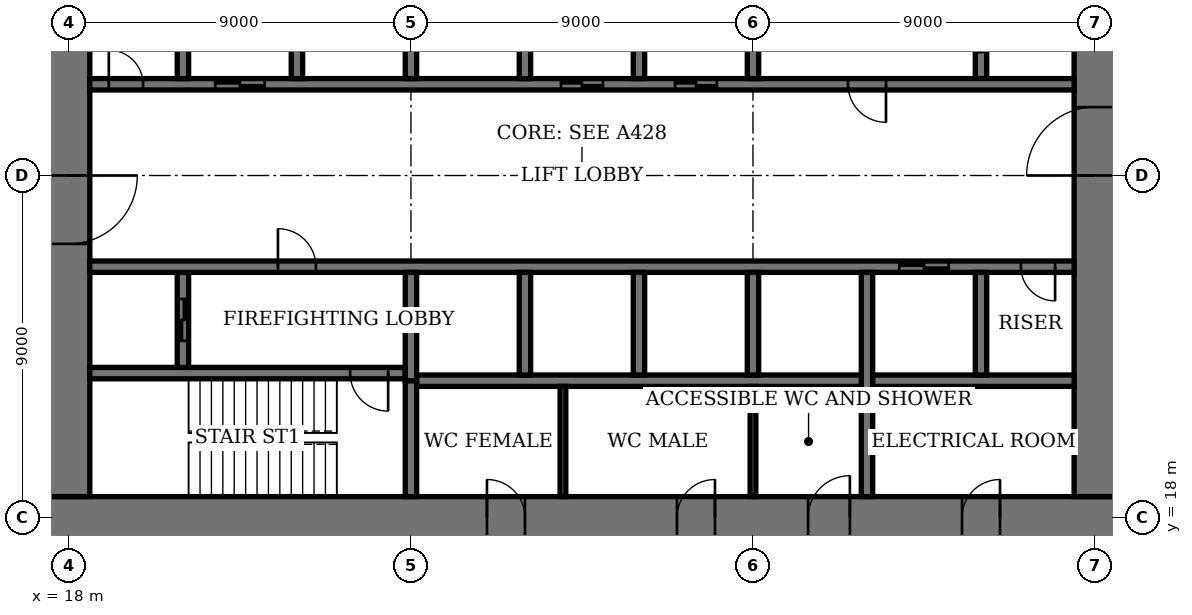
"""IFC4 building model, lengths in metres.
Left out: names, types, materials, properties, quantities, classifications, styles, units other than length and angle.
Written with IfcOpenShell. Run it as: python <this file> out.ifc"""

import sys

from ifc_helpers import new_model, si_unit, direction, frame, frame_2d, origin, place, context, subcontext, project, spatial, rectangle, extrude, element, fill, save


model = new_model("IFC4")
c1 = context("Model", 3, precision=1e-05, world=origin(), true_north=direction((0.0, 1.0)))
c2 = subcontext(c1, "Body", "Model", "MODEL_VIEW")
j1 = project(units=[si_unit("LENGTHUNIT", "METRE"), si_unit("PLANEANGLEUNIT", "RADIAN")], contexts=[c1])
p1 = place(None, origin())
s1 = spatial("IfcSite", under=j1, at=p1, CompositionType="ELEMENT")
p2 = place(p1, origin())
s2 = spatial("IfcBuilding", under=s1, at=p2, CompositionType="ELEMENT")
p3 = place(p2, frame((0.0, 0.0, 117.0)))
s3 = spatial("IfcBuildingStorey", under=s2, at=p3, CompositionType="ELEMENT", Elevation=117.0)
p4 = place(p3, frame((17.45, 18.0, 0.0), z_axis=(0.0, 0.0, 1.0), x_axis=(1.0, 0.0, 0.0)))
e1 = element("IfcWall", 1, at=p4, inside=s3, PredefinedType="SHEAR", context=c2, shape_type="SweptSolid", body=[
    extrude(rectangle(XDim=28.1, YDim=1.1, at=frame_2d((14.05, 0.0))), origin(), (0.0, 0.0, 1.0), 4.0),
])
p5 = place(p4, frame((11.55, 0.0, 0.0)))
e2 = element("IfcOpeningElement", 2, at=p5, cuts=e1, PredefinedType="OPENING", context=c2, shape_type="SweptSolid", body=[
    extrude(rectangle(XDim=1.0, YDim=2.4, at=frame_2d((0.5, 1.2))), frame((0.0, 0.56, 0.0), z_axis=(0.0, -1.0, 0.0), x_axis=(1.0, 0.0, 0.0)), (0.0, 0.0, 1.0), 1.12),
])
p6 = place(p4, frame((16.55, 0.0, 0.0)))
e3 = element("IfcOpeningElement", 3, at=p6, cuts=e1, PredefinedType="OPENING", context=c2, shape_type="SweptSolid", body=[
    extrude(rectangle(XDim=1.0, YDim=2.4, at=frame_2d((0.5, 1.2))), frame((0.0, 0.56, 0.0), z_axis=(0.0, -1.0, 0.0), x_axis=(1.0, 0.0, 0.0)), (0.0, 0.0, 1.0), 1.12),
])
p7 = place(p4, frame((20.0, 0.0, 0.0)))
e4 = element("IfcOpeningElement", 4, at=p7, cuts=e1, PredefinedType="OPENING", context=c2, shape_type="SweptSolid", body=[
    extrude(rectangle(XDim=1.1, YDim=2.4, at=frame_2d((0.55, 1.2))), frame((0.0, 0.56, 0.0), z_axis=(0.0, -1.0, 0.0), x_axis=(1.0, 0.0, 0.0)), (0.0, 0.0, 1.0), 1.12),
])
p8 = place(p4, frame((24.05, 0.0, 0.0)))
e5 = element("IfcOpeningElement", 5, at=p8, cuts=e1, PredefinedType="OPENING", context=c2, shape_type="SweptSolid", body=[
    extrude(rectangle(XDim=1.0, YDim=2.4, at=frame_2d((0.5, 1.2))), frame((0.0, 0.56, 0.0), z_axis=(0.0, -1.0, 0.0), x_axis=(1.0, 0.0, 0.0)), (0.0, 0.0, 1.0), 1.12),
])
p9 = place(p3, frame((18.0, 35.45, 0.0), z_axis=(0.0, 0.0, 1.0), x_axis=(0.0, -1.0, 0.0)))
e6 = element("IfcWall", 6, at=p9, inside=s3, PredefinedType="SHEAR", context=c2, shape_type="SweptSolid", body=[
    extrude(rectangle(XDim=16.9, YDim=1.1, at=frame_2d((8.45, 0.0))), origin(), (0.0, 0.0, 1.0), 4.0),
])
p10 = place(p9, frame((8.45, 0.0, 0.0)))
e7 = element("IfcOpeningElement", 7, at=p10, cuts=e6, PredefinedType="OPENING", context=c2, shape_type="SweptSolid", body=[
    extrude(rectangle(XDim=1.8, YDim=2.4, at=frame_2d((0.9, 1.2))), frame((0.0, 0.56, 0.0), z_axis=(0.0, -1.0, 0.0), x_axis=(1.0, 0.0, 0.0)), (0.0, 0.0, 1.0), 1.12),
])
p11 = place(p3, frame((45.0, 18.55, 0.0), z_axis=(0.0, 0.0, 1.0), x_axis=(0.0, 1.0, 0.0)))
e8 = element("IfcWall", 8, at=p11, inside=s3, PredefinedType="SHEAR", context=c2, shape_type="SweptSolid", body=[
    extrude(rectangle(XDim=16.9, YDim=1.1, at=frame_2d((8.45, 0.0))), origin(), (0.0, 0.0, 1.0), 4.0),
])
p12 = place(p11, frame((8.45, 0.0, 0.0)))
e9 = element("IfcOpeningElement", 9, at=p12, cuts=e8, PredefinedType="OPENING", context=c2, shape_type="SweptSolid", body=[
    extrude(rectangle(XDim=1.8, YDim=2.4, at=frame_2d((0.9, 1.2))), frame((0.0, 0.56, 0.0), z_axis=(0.0, -1.0, 0.0), x_axis=(1.0, 0.0, 0.0)), (0.0, 0.0, 1.0), 1.12),
])
p13 = place(p3, frame((18.55, 21.8, 0.0), z_axis=(0.0, 0.0, 1.0), x_axis=(1.0, 0.0, 0.0)))
e10 = element("IfcWall", 10, at=p13, inside=s3, PredefinedType="SHEAR", context=c2, shape_type="SweptSolid", body=[
    extrude(rectangle(XDim=8.3, YDim=0.3, at=frame_2d((4.15, 0.0))), origin(), (0.0, 0.0, 1.0), 4.0),
])
p14 = place(p13, frame((6.85, 0.0, 0.0)))
e11 = element("IfcOpeningElement", 11, at=p14, cuts=e10, PredefinedType="OPENING", context=c2, shape_type="SweptSolid", body=[
    extrude(rectangle(XDim=1.0, YDim=2.4, at=frame_2d((0.5, 1.2))), frame((0.0, 0.16, 0.0), z_axis=(0.0, -1.0, 0.0), x_axis=(1.0, 0.0, 0.0)), (0.0, 0.0, 1.0), 0.32),
])
p15 = place(p3, frame((27.0, 18.55, 0.0), z_axis=(0.0, 0.0, 1.0), x_axis=(0.0, 1.0, 0.0)))
e12 = element("IfcWall", 12, at=p15, inside=s3, PredefinedType="SHEAR", context=c2, shape_type="SweptSolid", body=[
    extrude(rectangle(XDim=3.05, YDim=0.3, at=frame_2d((1.525, 0.0))), origin(), (0.0, 0.0, 1.0), 4.0),
])
p16 = place(p3, frame((21.0, 21.95, 0.0), z_axis=(0.0, 0.0, 1.0), x_axis=(0.0, 1.0, 0.0)))
e13 = element("IfcWall", 13, at=p16, inside=s3, PredefinedType="SHEAR", context=c2, shape_type="SweptSolid", body=[
    extrude(rectangle(XDim=2.5, YDim=0.3, at=frame_2d((1.25, 0.0))), origin(), (0.0, 0.0, 1.0), 4.0),
])
p17 = place(p16, frame((0.7, 0.0, 0.0)))
e14 = element("IfcOpeningElement", 14, at=p17, cuts=e13, PredefinedType="OPENING", context=c2, shape_type="SweptSolid", body=[
    extrude(rectangle(XDim=1.1, YDim=2.4, at=frame_2d((0.55, 1.2))), frame((0.0, 0.16, 0.0), z_axis=(0.0, -1.0, 0.0), x_axis=(1.0, 0.0, 0.0)), (0.0, 0.0, 1.0), 0.32),
])
p18 = place(p3, frame((42.0, 29.55, 0.0), z_axis=(0.0, 0.0, 1.0), x_axis=(0.0, 1.0, 0.0)))
e15 = element("IfcWall", 15, at=p18, inside=s3, PredefinedType="SHEAR", context=c2, shape_type="SweptSolid", body=[
    extrude(rectangle(XDim=2.5, YDim=0.3, at=frame_2d((1.25, 0.0))), origin(), (0.0, 0.0, 1.0), 4.0),
])
p19 = place(p18, frame((0.7, 0.0, 0.0)))
e16 = element("IfcOpeningElement", 16, at=p19, cuts=e15, PredefinedType="OPENING", context=c2, shape_type="SweptSolid", body=[
    extrude(rectangle(XDim=1.1, YDim=2.4, at=frame_2d((0.55, 1.2))), frame((0.0, 0.16, 0.0), z_axis=(0.0, -1.0, 0.0), x_axis=(1.0, 0.0, 0.0)), (0.0, 0.0, 1.0), 0.32),
])
p20 = place(p3, frame((18.55, 24.6, 0.0), z_axis=(0.0, 0.0, 1.0), x_axis=(1.0, 0.0, 0.0)))
e17 = element("IfcWall", 17, at=p20, inside=s3, PredefinedType="SHEAR", context=c2, shape_type="SweptSolid", body=[
    extrude(rectangle(XDim=25.9, YDim=0.3, at=frame_2d((12.95, 0.0))), origin(), (0.0, 0.0, 1.0), 4.0),
])
p21 = place(p20, frame((4.95, 0.0, 0.0)))
e18 = element("IfcOpeningElement", 18, at=p21, cuts=e17, PredefinedType="OPENING", context=c2, shape_type="SweptSolid", body=[
    extrude(rectangle(XDim=1.0, YDim=2.4, at=frame_2d((0.5, 1.2))), frame((0.0, 0.16, 0.0), z_axis=(0.0, -1.0, 0.0), x_axis=(1.0, 0.0, 0.0)), (0.0, 0.0, 1.0), 0.32),
])
p22 = place(p20, frame((24.5, 0.0, 0.0)))
e19 = element("IfcOpeningElement", 19, at=p22, cuts=e17, PredefinedType="OPENING", context=c2, shape_type="SweptSolid", body=[
    extrude(rectangle(XDim=0.9, YDim=2.1, at=frame_2d((0.45, 1.05))), frame((0.0, 0.16, 0.0), z_axis=(0.0, -1.0, 0.0), x_axis=(1.0, 0.0, 0.0)), (0.0, 0.0, 1.0), 0.32),
])
p23 = place(p20, frame((21.3, 0.0, 0.0)))
e20 = element("IfcOpeningElement", 20, at=p23, cuts=e17, PredefinedType="OPENING", context=c2, shape_type="SweptSolid", body=[
    extrude(rectangle(XDim=1.3, YDim=2.4, at=frame_2d((0.65, 1.2))), frame((0.0, 0.16, 0.0), z_axis=(0.0, -1.0, 0.0), x_axis=(1.0, 0.0, 0.0)), (0.0, 0.0, 1.0), 0.32),
])
p24 = place(p3, frame((18.55, 29.4, 0.0), z_axis=(0.0, 0.0, 1.0), x_axis=(1.0, 0.0, 0.0)))
e21 = element("IfcWall", 21, at=p24, inside=s3, PredefinedType="SHEAR", context=c2, shape_type="SweptSolid", body=[
    extrude(rectangle(XDim=25.9, YDim=0.3, at=frame_2d((12.95, 0.0))), origin(), (0.0, 0.0, 1.0), 4.0),
])
p25 = place(p24, frame((19.95, 0.0, 0.0)))
e22 = element("IfcOpeningElement", 22, at=p25, cuts=e21, PredefinedType="OPENING", context=c2, shape_type="SweptSolid", body=[
    extrude(rectangle(XDim=1.0, YDim=2.4, at=frame_2d((0.5, 1.2))), frame((0.0, 0.16, 0.0), z_axis=(0.0, -1.0, 0.0), x_axis=(1.0, 0.0, 0.0)), (0.0, 0.0, 1.0), 0.32),
])
p26 = place(p24, frame((0.5, 0.0, 0.0)))
e23 = element("IfcOpeningElement", 23, at=p26, cuts=e21, PredefinedType="OPENING", context=c2, shape_type="SweptSolid", body=[
    extrude(rectangle(XDim=0.9, YDim=2.1, at=frame_2d((0.45, 1.05))), frame((0.0, 0.16, 0.0), z_axis=(0.0, -1.0, 0.0), x_axis=(1.0, 0.0, 0.0)), (0.0, 0.0, 1.0), 0.32),
])
p27 = place(p24, frame((15.4, 0.0, 0.0)))
e24 = element("IfcOpeningElement", 24, at=p27, cuts=e21, PredefinedType="OPENING", context=c2, shape_type="SweptSolid", body=[
    extrude(rectangle(XDim=1.1, YDim=2.4, at=frame_2d((0.55, 1.2))), frame((0.0, 0.16, 0.0), z_axis=(0.0, -1.0, 0.0), x_axis=(1.0, 0.0, 0.0)), (0.0, 0.0, 1.0), 0.32),
])
p28 = place(p24, frame((12.4, 0.0, 0.0)))
e25 = element("IfcOpeningElement", 25, at=p28, cuts=e21, PredefinedType="OPENING", context=c2, shape_type="SweptSolid", body=[
    extrude(rectangle(XDim=1.1, YDim=2.4, at=frame_2d((0.55, 1.2))), frame((0.0, 0.16, 0.0), z_axis=(0.0, -1.0, 0.0), x_axis=(1.0, 0.0, 0.0)), (0.0, 0.0, 1.0), 0.32),
])
p29 = place(p24, frame((3.3, 0.0, 0.0)))
e26 = element("IfcOpeningElement", 26, at=p29, cuts=e21, PredefinedType="OPENING", context=c2, shape_type="SweptSolid", body=[
    extrude(rectangle(XDim=1.3, YDim=2.4, at=frame_2d((0.65, 1.2))), frame((0.0, 0.16, 0.0), z_axis=(0.0, -1.0, 0.0), x_axis=(1.0, 0.0, 0.0)), (0.0, 0.0, 1.0), 0.32),
])
p30 = place(p3, frame((27.15, 21.6, 0.0), z_axis=(0.0, 0.0, 1.0), x_axis=(1.0, 0.0, 0.0)))
e27 = element("IfcWall", 27, at=p30, inside=s3, PredefinedType="SHEAR", context=c2, shape_type="SweptSolid", body=[
    extrude(rectangle(XDim=17.3, YDim=0.3, at=frame_2d((8.65, 0.0))), origin(), (0.0, 0.0, 1.0), 4.0),
])
for number, where, z_axis, x_axis in (
    (28, (30.0, 21.75, 0.0), (0.0, 0.0, 1.0), (0.0, 1.0, 0.0)),
    (29, (33.0, 29.55, 0.0), (0.0, 0.0, 1.0), (0.0, 1.0, 0.0)),
    (30, (33.0, 21.75, 0.0), (0.0, 0.0, 1.0), (0.0, 1.0, 0.0)),
    (31, (30.0, 29.55, 0.0), (0.0, 0.0, 1.0), (0.0, 1.0, 0.0)),
    (32, (36.0, 21.75, 0.0), (0.0, 0.0, 1.0), (0.0, 1.0, 0.0)),
    (33, (27.0, 29.55, 0.0), (0.0, 0.0, 1.0), (0.0, 1.0, 0.0)),
):
    element("IfcWall", number, at=place(p3, frame(where, z_axis=z_axis, x_axis=x_axis)), inside=s3, PredefinedType="SHEAR", context=c2, shape_type="SweptSolid", body=[
        extrude(rectangle(XDim=2.7, YDim=0.3, at=frame_2d((1.35, 0.0))), origin(), (0.0, 0.0, 1.0), 4.0),
    ])
for number, where, z_axis, x_axis in (
    (34, (39.0, 18.55, 0.0), (0.0, 0.0, 1.0), (0.0, 1.0, 0.0)),
    (35, (24.0, 29.55, 0.0), (0.0, 0.0, 1.0), (0.0, 1.0, 0.0)),
):
    element("IfcWall", number, at=place(p3, frame(where, z_axis=z_axis, x_axis=x_axis)), inside=s3, PredefinedType="SHEAR", context=c2, shape_type="SweptSolid", body=[
        extrude(rectangle(XDim=5.9, YDim=0.3, at=frame_2d((2.95, 0.0))), origin(), (0.0, 0.0, 1.0), 4.0),
    ])
for number, where, z_axis, x_axis in (
    (36, (42.0, 21.75, 0.0), (0.0, 0.0, 1.0), (0.0, 1.0, 0.0)),
    (37, (21.0, 29.55, 0.0), (0.0, 0.0, 1.0), (0.0, 1.0, 0.0)),
):
    element("IfcWall", number, at=place(p3, frame(where, z_axis=z_axis, x_axis=x_axis)), inside=s3, PredefinedType="SHEAR", context=c2, shape_type="SweptSolid", body=[
        extrude(rectangle(XDim=2.7, YDim=0.3, at=frame_2d((1.35, 0.0))), origin(), (0.0, 0.0, 1.0), 4.0),
    ])
for number, where, z_axis, x_axis in (
    (38, (27.0, 21.6, 0.0), (0.0, 0.0, 1.0), (0.0, 1.0, 0.0)),
    (39, (36.0, 29.55, 0.0), (0.0, 0.0, 1.0), (0.0, 1.0, 0.0)),
):
    element("IfcWall", number, at=place(p3, frame(where, z_axis=z_axis, x_axis=x_axis)), inside=s3, PredefinedType="SHEAR", context=c2, shape_type="SweptSolid", body=[
        extrude(rectangle(XDim=2.85, YDim=0.3, at=frame_2d((1.425, 0.0))), origin(), (0.0, 0.0, 1.0), 4.0),
    ])
for number, where, z_axis, x_axis in (
    (40, (31.0, 18.55, 0.0), (0.0, 0.0, 1.0), (0.0, 1.0, 0.0)),
    (41, (36.0, 18.55, 0.0), (0.0, 0.0, 1.0), (0.0, 1.0, 0.0)),
):
    element("IfcWall", number, at=place(p3, frame(where, z_axis=z_axis, x_axis=x_axis)), inside=s3, PredefinedType="PARTITIONING", context=c2, shape_type="SweptSolid", body=[
        extrude(rectangle(XDim=2.9, YDim=0.15, at=frame_2d((1.45, 0.0))), origin(), (0.0, 0.0, 1.0), 3.75),
    ])
p31 = place(p10, origin())
e42 = element("IfcDoor", 42, at=p31, inside=s3, OperationType="DOUBLE_DOOR_DOUBLE_SWING", PredefinedType="DOOR", context=c2, shape_type="SweptSolid", body=[
    extrude(rectangle(XDim=1.8, YDim=2.4, at=frame_2d((0.9, 1.2))), frame((0.0, 0.03, 0.0), z_axis=(0.0, -1.0, 0.0), x_axis=(1.0, 0.0, 0.0)), (0.0, 0.0, 1.0), 0.06),
    extrude(rectangle(XDim=0.04, YDim=2.4, at=frame_2d((0.02, 1.2))), frame((0.0, 0.55, 0.0), z_axis=(0.0, -1.0, 0.0), x_axis=(1.0, 0.0, 0.0)), (0.0, 0.0, 1.0), 1.1),
    extrude(rectangle(XDim=0.04, YDim=2.4, at=frame_2d((1.78, 1.2))), frame((0.0, 0.55, 0.0), z_axis=(0.0, -1.0, 0.0), x_axis=(1.0, 0.0, 0.0)), (0.0, 0.0, 1.0), 1.1),
    extrude(rectangle(XDim=1.8, YDim=0.04, at=frame_2d((0.9, 2.38))), frame((0.0, 0.55, 0.0), z_axis=(0.0, -1.0, 0.0), x_axis=(1.0, 0.0, 0.0)), (0.0, 0.0, 1.0), 1.1),
])
fill(e7, e42)
p32 = place(p12, origin())
e43 = element("IfcDoor", 43, at=p32, inside=s3, OperationType="DOUBLE_DOOR_DOUBLE_SWING", PredefinedType="DOOR", context=c2, shape_type="SweptSolid", body=[
    extrude(rectangle(XDim=1.8, YDim=2.4, at=frame_2d((0.9, 1.2))), frame((0.0, 0.03, 0.0), z_axis=(0.0, -1.0, 0.0), x_axis=(1.0, 0.0, 0.0)), (0.0, 0.0, 1.0), 0.06),
    extrude(rectangle(XDim=0.04, YDim=2.4, at=frame_2d((0.02, 1.2))), frame((0.0, 0.55, 0.0), z_axis=(0.0, -1.0, 0.0), x_axis=(1.0, 0.0, 0.0)), (0.0, 0.0, 1.0), 1.1),
    extrude(rectangle(XDim=0.04, YDim=2.4, at=frame_2d((1.78, 1.2))), frame((0.0, 0.55, 0.0), z_axis=(0.0, -1.0, 0.0), x_axis=(1.0, 0.0, 0.0)), (0.0, 0.0, 1.0), 1.1),
    extrude(rectangle(XDim=1.8, YDim=0.04, at=frame_2d((0.9, 2.38))), frame((0.0, 0.55, 0.0), z_axis=(0.0, -1.0, 0.0), x_axis=(1.0, 0.0, 0.0)), (0.0, 0.0, 1.0), 1.1),
])
fill(e9, e43)
p33 = place(p5, origin())
e44 = element("IfcDoor", 44, at=p33, inside=s3, OperationType="SINGLE_SWING_RIGHT", PredefinedType="DOOR", context=c2, shape_type="SweptSolid", body=[
    extrude(rectangle(XDim=1.0, YDim=2.4, at=frame_2d((0.5, 1.2))), frame((0.0, 0.025, 0.0), z_axis=(0.0, -1.0, 0.0), x_axis=(1.0, 0.0, 0.0)), (0.0, 0.0, 1.0), 0.05),
    extrude(rectangle(XDim=0.04, YDim=2.4, at=frame_2d((0.02, 1.2))), frame((0.0, 0.4, 0.0), z_axis=(0.0, -1.0, 0.0), x_axis=(1.0, 0.0, 0.0)), (0.0, 0.0, 1.0), 0.8),
    extrude(rectangle(XDim=0.04, YDim=2.4, at=frame_2d((0.98, 1.2))), frame((0.0, 0.4, 0.0), z_axis=(0.0, -1.0, 0.0), x_axis=(1.0, 0.0, 0.0)), (0.0, 0.0, 1.0), 0.8),
    extrude(rectangle(XDim=1.0, YDim=0.04, at=frame_2d((0.5, 2.38))), frame((0.0, 0.4, 0.0), z_axis=(0.0, -1.0, 0.0), x_axis=(1.0, 0.0, 0.0)), (0.0, 0.0, 1.0), 0.8),
])
fill(e2, e44)
p34 = place(p6, origin())
e45 = element("IfcDoor", 45, at=p34, inside=s3, OperationType="SINGLE_SWING_LEFT", PredefinedType="DOOR", context=c2, shape_type="SweptSolid", body=[
    extrude(rectangle(XDim=1.0, YDim=2.4, at=frame_2d((0.5, 1.2))), frame((0.0, 0.025, 0.0), z_axis=(0.0, -1.0, 0.0), x_axis=(1.0, 0.0, 0.0)), (0.0, 0.0, 1.0), 0.05),
    extrude(rectangle(XDim=0.04, YDim=2.4, at=frame_2d((0.02, 1.2))), frame((0.0, 0.4, 0.0), z_axis=(0.0, -1.0, 0.0), x_axis=(1.0, 0.0, 0.0)), (0.0, 0.0, 1.0), 0.8),
    extrude(rectangle(XDim=0.04, YDim=2.4, at=frame_2d((0.98, 1.2))), frame((0.0, 0.4, 0.0), z_axis=(0.0, -1.0, 0.0), x_axis=(1.0, 0.0, 0.0)), (0.0, 0.0, 1.0), 0.8),
    extrude(rectangle(XDim=1.0, YDim=0.04, at=frame_2d((0.5, 2.38))), frame((0.0, 0.4, 0.0), z_axis=(0.0, -1.0, 0.0), x_axis=(1.0, 0.0, 0.0)), (0.0, 0.0, 1.0), 0.8),
])
fill(e3, e45)
p35 = place(p7, origin())
e46 = element("IfcDoor", 46, at=p35, inside=s3, OperationType="SINGLE_SWING_LEFT", PredefinedType="DOOR", context=c2, shape_type="SweptSolid", body=[
    extrude(rectangle(XDim=1.1, YDim=2.4, at=frame_2d((0.55, 1.2))), frame((0.0, 0.025, 0.0), z_axis=(0.0, -1.0, 0.0), x_axis=(1.0, 0.0, 0.0)), (0.0, 0.0, 1.0), 0.05),
    extrude(rectangle(XDim=0.04, YDim=2.4, at=frame_2d((0.02, 1.2))), frame((0.0, 0.44, 0.0), z_axis=(0.0, -1.0, 0.0), x_axis=(1.0, 0.0, 0.0)), (0.0, 0.0, 1.0), 0.88),
    extrude(rectangle(XDim=0.04, YDim=2.4, at=frame_2d((1.08, 1.2))), frame((0.0, 0.44, 0.0), z_axis=(0.0, -1.0, 0.0), x_axis=(1.0, 0.0, 0.0)), (0.0, 0.0, 1.0), 0.88),
    extrude(rectangle(XDim=1.1, YDim=0.04, at=frame_2d((0.55, 2.38))), frame((0.0, 0.44, 0.0), z_axis=(0.0, -1.0, 0.0), x_axis=(1.0, 0.0, 0.0)), (0.0, 0.0, 1.0), 0.88),
])
fill(e4, e46)
p36 = place(p8, origin())
e47 = element("IfcDoor", 47, at=p36, inside=s3, OperationType="SINGLE_SWING_LEFT", PredefinedType="DOOR", context=c2, shape_type="SweptSolid", body=[
    extrude(rectangle(XDim=1.0, YDim=2.4, at=frame_2d((0.5, 1.2))), frame((0.0, 0.025, 0.0), z_axis=(0.0, -1.0, 0.0), x_axis=(1.0, 0.0, 0.0)), (0.0, 0.0, 1.0), 0.05),
    extrude(rectangle(XDim=0.04, YDim=2.4, at=frame_2d((0.02, 1.2))), frame((0.0, 0.4, 0.0), z_axis=(0.0, -1.0, 0.0), x_axis=(1.0, 0.0, 0.0)), (0.0, 0.0, 1.0), 0.8),
    extrude(rectangle(XDim=0.04, YDim=2.4, at=frame_2d((0.98, 1.2))), frame((0.0, 0.4, 0.0), z_axis=(0.0, -1.0, 0.0), x_axis=(1.0, 0.0, 0.0)), (0.0, 0.0, 1.0), 0.8),
    extrude(rectangle(XDim=1.0, YDim=0.04, at=frame_2d((0.5, 2.38))), frame((0.0, 0.4, 0.0), z_axis=(0.0, -1.0, 0.0), x_axis=(1.0, 0.0, 0.0)), (0.0, 0.0, 1.0), 0.8),
])
fill(e5, e47)
p37 = place(p14, origin())
e48 = element("IfcDoor", 48, at=p37, inside=s3, OperationType="SINGLE_SWING_RIGHT", PredefinedType="DOOR", context=c2, shape_type="SweptSolid", body=[
    extrude(rectangle(XDim=1.0, YDim=2.4, at=frame_2d((0.5, 1.2))), frame((0.0, 0.03, 0.0), z_axis=(0.0, -1.0, 0.0), x_axis=(1.0, 0.0, 0.0)), (0.0, 0.0, 1.0), 0.06),
])
fill(e11, e48)
p38 = place(p21, origin())
e49 = element("IfcDoor", 49, at=p38, inside=s3, OperationType="SINGLE_SWING_RIGHT", PredefinedType="DOOR", context=c2, shape_type="SweptSolid", body=[
    extrude(rectangle(XDim=1.0, YDim=2.4, at=frame_2d((0.5, 1.2))), frame((0.0, 0.03, 0.0), z_axis=(0.0, -1.0, 0.0), x_axis=(1.0, 0.0, 0.0)), (0.0, 0.0, 1.0), 0.06),
])
fill(e18, e49)
p39 = place(p25, origin())
e50 = element("IfcDoor", 50, at=p39, inside=s3, OperationType="SINGLE_SWING_RIGHT", PredefinedType="DOOR", context=c2, shape_type="SweptSolid", body=[
    extrude(rectangle(XDim=1.0, YDim=2.4, at=frame_2d((0.5, 1.2))), frame((0.0, 0.03, 0.0), z_axis=(0.0, -1.0, 0.0), x_axis=(1.0, 0.0, 0.0)), (0.0, 0.0, 1.0), 0.06),
])
fill(e22, e50)
p40 = place(p22, origin())
e51 = element("IfcDoor", 51, at=p40, inside=s3, OperationType="SINGLE_SWING_RIGHT", PredefinedType="DOOR", context=c2, shape_type="SweptSolid", body=[
    extrude(rectangle(XDim=0.9, YDim=2.1, at=frame_2d((0.45, 1.05))), frame((0.0, 0.03, 0.0), z_axis=(0.0, -1.0, 0.0), x_axis=(1.0, 0.0, 0.0)), (0.0, 0.0, 1.0), 0.06),
])
fill(e19, e51)
p41 = place(p26, origin())
e52 = element("IfcDoor", 52, at=p41, inside=s3, OperationType="SINGLE_SWING_RIGHT", PredefinedType="DOOR", context=c2, shape_type="SweptSolid", body=[
    extrude(rectangle(XDim=0.9, YDim=2.1, at=frame_2d((0.45, 1.05))), frame((0.0, 0.03, 0.0), z_axis=(0.0, -1.0, 0.0), x_axis=(1.0, 0.0, 0.0)), (0.0, 0.0, 1.0), 0.06),
])
fill(e23, e52)
p42 = place(p27, origin())
e53 = element("IfcDoor", 53, at=p42, inside=s3, OperationType="DOUBLE_DOOR_SLIDING", PredefinedType="DOOR", context=c2, shape_type="SweptSolid", body=[
    extrude(rectangle(XDim=1.1, YDim=2.4, at=frame_2d((0.55, 1.2))), frame((0.0, 0.02, 0.0), z_axis=(0.0, -1.0, 0.0), x_axis=(1.0, 0.0, 0.0)), (0.0, 0.0, 1.0), 0.04),
])
fill(e24, e53)
p43 = place(p28, origin())
e54 = element("IfcDoor", 54, at=p43, inside=s3, OperationType="DOUBLE_DOOR_SLIDING", PredefinedType="DOOR", context=c2, shape_type="SweptSolid", body=[
    extrude(rectangle(XDim=1.1, YDim=2.4, at=frame_2d((0.55, 1.2))), frame((0.0, 0.02, 0.0), z_axis=(0.0, -1.0, 0.0), x_axis=(1.0, 0.0, 0.0)), (0.0, 0.0, 1.0), 0.04),
])
fill(e25, e54)
p44 = place(p23, origin())
e55 = element("IfcDoor", 55, at=p44, inside=s3, OperationType="DOUBLE_DOOR_SLIDING", PredefinedType="DOOR", context=c2, shape_type="SweptSolid", body=[
    extrude(rectangle(XDim=1.3, YDim=2.4, at=frame_2d((0.65, 1.2))), frame((0.0, 0.02, 0.0), z_axis=(0.0, -1.0, 0.0), x_axis=(1.0, 0.0, 0.0)), (0.0, 0.0, 1.0), 0.04),
])
fill(e20, e55)
p45 = place(p29, origin())
e56 = element("IfcDoor", 56, at=p45, inside=s3, OperationType="DOUBLE_DOOR_SLIDING", PredefinedType="DOOR", context=c2, shape_type="SweptSolid", body=[
    extrude(rectangle(XDim=1.3, YDim=2.4, at=frame_2d((0.65, 1.2))), frame((0.0, 0.02, 0.0), z_axis=(0.0, -1.0, 0.0), x_axis=(1.0, 0.0, 0.0)), (0.0, 0.0, 1.0), 0.04),
])
fill(e26, e56)
p46 = place(p17, origin())
e57 = element("IfcDoor", 57, at=p46, inside=s3, OperationType="DOUBLE_DOOR_SLIDING", PredefinedType="DOOR", context=c2, shape_type="SweptSolid", body=[
    extrude(rectangle(XDim=1.1, YDim=2.4, at=frame_2d((0.55, 1.2))), frame((0.0, 0.03, 0.0), z_axis=(0.0, -1.0, 0.0), x_axis=(1.0, 0.0, 0.0)), (0.0, 0.0, 1.0), 0.06),
])
fill(e14, e57)
save(model, sys.argv[1])
